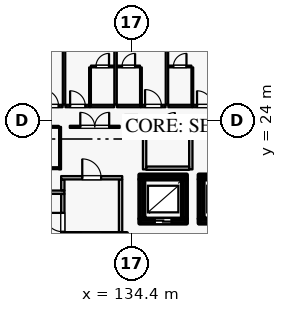
"""IFC4 building model, lengths in metres.
Left out: names, types, materials, properties, quantities, classifications, styles, units other than length and angle.
Written with IfcOpenShell. Run it as: python <this file> out.ifc"""

import sys

from ifc_helpers import new_model, si_unit, direction, frame, frame_2d, origin, origin_2d, place, context, subcontext, project, spatial, rectangle, extrude, element, fill, save


model = new_model("IFC4")
c1 = context("Model", 3, precision=1e-05, world=origin(), true_north=direction((0.0, 1.0)))
c2 = subcontext(c1, "Body", "Model", "MODEL_VIEW")
j1 = project(units=[si_unit("LENGTHUNIT", "METRE"), si_unit("PLANEANGLEUNIT", "RADIAN")], contexts=[c1])
p1 = place(None, origin())
s1 = spatial("IfcSite", under=j1, at=p1, CompositionType="ELEMENT")
p2 = place(p1, origin())
s2 = spatial("IfcBuilding", under=s1, at=p2, CompositionType="ELEMENT")
p3 = place(p2, frame((0.0, 0.0, 43.2)))
s3 = spatial("IfcBuildingStorey", under=s2, at=p3, CompositionType="ELEMENT", Elevation=43.2)
p4 = place(p3, frame((134.4, 24.0, 0.0), z_axis=(0.0, 0.0, 1.0), x_axis=(1.0, 0.0, 0.0)))
e1 = element("IfcColumn", 1, at=p4, inside=s3, PredefinedType="COLUMN", context=c2, shape_type="SweptSolid", body=[
    extrude(rectangle(XDim=0.6, YDim=0.6, at=origin_2d()), origin(), (0.0, 0.0, 1.0), 4.2),
])
p5 = place(p3, frame((134.95, 17.4, 0.0), z_axis=(0.0, 0.0, 1.0), x_axis=(1.0, 0.0, 0.0)))
e2 = element("IfcWall", 2, at=p5, inside=s3, PredefinedType="SHEAR", context=c2, shape_type="SweptSolid", body=[
    extrude(rectangle(XDim=3.1, YDim=0.3, at=frame_2d((1.55, 0.0))), origin(), (0.0, 0.0, 1.0), 3.935),
])
p6 = place(p5, frame((1.0, 0.0, 0.0)))
e3 = element("IfcOpeningElement", 3, at=p6, cuts=e2, PredefinedType="OPENING", context=c2, shape_type="SweptSolid", body=[
    extrude(rectangle(XDim=1.1, YDim=2.2, at=frame_2d((0.55, 1.1))), frame((0.0, 0.16, 0.0), z_axis=(0.0, -1.0, 0.0), x_axis=(1.0, 0.0, 0.0)), (0.0, 0.0, 1.0), 0.32),
])
p7 = place(p3, frame((137.9, 17.555, 0.0), z_axis=(0.0, 0.0, 1.0), x_axis=(0.0, 1.0, 0.0)))
e4 = element("IfcWall", 4, at=p7, inside=s3, PredefinedType="SHEAR", context=c2, shape_type="SweptSolid", body=[
    extrude(rectangle(XDim=2.59, YDim=0.3, at=frame_2d((1.295, 0.0))), origin(), (0.0, 0.0, 1.0), 3.935),
])
p8 = place(p3, frame((138.05, 20.3, 0.0), z_axis=(0.0, 0.0, 1.0), x_axis=(-1.0, 0.0, 0.0)))
e5 = element("IfcWall", 5, at=p8, inside=s3, PredefinedType="SHEAR", context=c2, shape_type="SweptSolid", body=[
    extrude(rectangle(XDim=3.1, YDim=0.3, at=frame_2d((1.55, 0.0))), origin(), (0.0, 0.0, 1.0), 3.935),
])
p9 = place(p3, frame((135.1, 20.145, 0.0), z_axis=(0.0, 0.0, 1.0), x_axis=(0.0, -1.0, 0.0)))
e6 = element("IfcWall", 6, at=p9, inside=s3, PredefinedType="SHEAR", context=c2, shape_type="SweptSolid", body=[
    extrude(rectangle(XDim=2.59, YDim=0.3, at=frame_2d((1.295, 0.0))), origin(), (0.0, 0.0, 1.0), 3.935),
])
p10 = place(p3, frame((138.85, 17.4, 0.0), z_axis=(0.0, 0.0, 1.0), x_axis=(1.0, 0.0, 0.0)))
e7 = element("IfcWall", 7, at=p10, inside=s3, PredefinedType="SHEAR", context=c2, shape_type="SweptSolid", body=[
    extrude(rectangle(XDim=3.1, YDim=0.3, at=frame_2d((1.55, 0.0))), origin(), (0.0, 0.0, 1.0), 3.935),
])
p11 = place(p10, frame((1.0, 0.0, 0.0)))
e8 = element("IfcOpeningElement", 8, at=p11, cuts=e7, PredefinedType="OPENING", context=c2, shape_type="SweptSolid", body=[
    extrude(rectangle(XDim=1.1, YDim=2.2, at=frame_2d((0.55, 1.1))), frame((0.0, 0.16, 0.0), z_axis=(0.0, -1.0, 0.0), x_axis=(1.0, 0.0, 0.0)), (0.0, 0.0, 1.0), 0.32),
])
p12 = place(p3, frame((141.95, 20.3, 0.0), z_axis=(0.0, 0.0, 1.0), x_axis=(-1.0, 0.0, 0.0)))
e9 = element("IfcWall", 9, at=p12, inside=s3, PredefinedType="SHEAR", context=c2, shape_type="SweptSolid", body=[
    extrude(rectangle(XDim=3.1, YDim=0.3, at=frame_2d((1.55, 0.0))), origin(), (0.0, 0.0, 1.0), 3.935),
])
p13 = place(p3, frame((139.0, 20.145, 0.0), z_axis=(0.0, 0.0, 1.0), x_axis=(0.0, -1.0, 0.0)))
e10 = element("IfcWall", 10, at=p13, inside=s3, PredefinedType="SHEAR", context=c2, shape_type="SweptSolid", body=[
    extrude(rectangle(XDim=2.59, YDim=0.3, at=frame_2d((1.295, 0.0))), origin(), (0.0, 0.0, 1.0), 3.935),
])
p14 = place(p3, frame((134.11, 16.45, 0.0), z_axis=(0.0, 0.0, 1.0), x_axis=(-1.0, 0.0, 0.0)))
e11 = element("IfcWall", 11, at=p14, inside=s3, PredefinedType="SHEAR", context=c2, shape_type="SweptSolid", body=[
    extrude(rectangle(XDim=4.06, YDim=0.3, at=frame_2d((2.03, 0.0))), origin(), (0.0, 0.0, 1.0), 3.935),
])
p15 = place(p14, frame((1.685, 0.0, 0.0)))
e12 = element("IfcOpeningElement", 12, at=p15, cuts=e11, PredefinedType="OPENING", context=c2, shape_type="SweptSolid", body=[
    extrude(rectangle(XDim=1.25, YDim=2.25, at=frame_2d((0.625, 1.125))), frame((0.0, 0.16, 0.0), z_axis=(0.0, -1.0, 0.0), x_axis=(1.0, 0.0, 0.0)), (0.0, 0.0, 1.0), 0.32),
])
p16 = place(p3, frame((126.19, 19.3, 0.0), z_axis=(0.0, 0.0, 1.0), x_axis=(1.0, 0.0, 0.0)))
e13 = element("IfcWall", 13, at=p16, inside=s3, PredefinedType="PARTITIONING", context=c2, shape_type="SweptSolid", body=[
    extrude(rectangle(XDim=3.82, YDim=0.22, at=frame_2d((1.91, 0.0))), origin(), (0.0, 0.0, 1.0), 3.935),
])
p17 = place(p16, frame((1.35, 0.0, 0.0)))
e14 = element("IfcOpeningElement", 14, at=p17, cuts=e13, PredefinedType="OPENING", context=c2, shape_type="SweptSolid", body=[
    extrude(rectangle(XDim=1.12, YDim=2.2, at=frame_2d((0.56, 1.1))), frame((0.0, 0.12, 0.0), z_axis=(0.0, -1.0, 0.0), x_axis=(1.0, 0.0, 0.0)), (0.0, 0.0, 1.0), 0.24),
])
p18 = place(p3, frame((129.9, 13.365, 0.0), z_axis=(0.0, 0.0, 1.0), x_axis=(0.0, 1.0, 0.0)))
e15 = element("IfcWall", 15, at=p18, inside=s3, PredefinedType="PARTITIONING", context=c2, shape_type="SweptSolid", body=[
    extrude(rectangle(XDim=5.82, YDim=0.22, at=frame_2d((2.91, 0.0))), origin(), (0.0, 0.0, 1.0), 3.935),
])
p19 = place(p18, frame((3.335, 0.0, 0.0)))
e16 = element("IfcOpeningElement", 16, at=p19, cuts=e15, PredefinedType="OPENING", context=c2, shape_type="SweptSolid", body=[
    extrude(rectangle(XDim=1.24, YDim=2.2, at=frame_2d((0.62, 1.1))), frame((0.0, 0.12, 0.0), z_axis=(0.0, -1.0, 0.0), x_axis=(1.0, 0.0, 0.0)), (0.0, 0.0, 1.0), 0.24),
])
p20 = place(p3, frame((129.9, 19.415, 0.0), z_axis=(0.0, 0.0, 1.0), x_axis=(0.0, 1.0, 0.0)))
e17 = element("IfcWall", 17, at=p20, inside=s3, PredefinedType="PARTITIONING", context=c2, shape_type="SweptSolid", body=[
    extrude(rectangle(XDim=0.72, YDim=0.22, at=frame_2d((0.36, 0.0))), origin(), (0.0, 0.0, 1.0), 3.935),
])
p21 = place(p3, frame((133.7, 16.605, 0.0), z_axis=(0.0, 0.0, 1.0), x_axis=(0.0, 1.0, 0.0)))
e18 = element("IfcWall", 18, at=p21, inside=s3, PredefinedType="PARTITIONING", context=c2, shape_type="SweptSolid", body=[
    extrude(rectangle(XDim=3.53, YDim=0.22, at=frame_2d((1.765, 0.0))), origin(), (0.0, 0.0, 1.0), 3.935),
])
p22 = place(p3, frame((129.79, 20.25, 0.0), z_axis=(0.0, 0.0, 1.0), x_axis=(1.0, 0.0, 0.0)))
e19 = element("IfcWall", 19, at=p22, inside=s3, PredefinedType="PARTITIONING", context=c2, shape_type="SweptSolid", body=[
    extrude(rectangle(XDim=4.02, YDim=0.22, at=frame_2d((2.01, 0.0))), origin(), (0.0, 0.0, 1.0), 3.935),
])
p23 = place(p22, frame((1.39, 0.0, 0.0)))
e20 = element("IfcOpeningElement", 20, at=p23, cuts=e19, PredefinedType="OPENING", context=c2, shape_type="SweptSolid", body=[
    extrude(rectangle(XDim=1.24, YDim=2.2, at=frame_2d((0.62, 1.1))), frame((0.0, 0.12, 0.0), z_axis=(0.0, -1.0, 0.0), x_axis=(1.0, 0.0, 0.0)), (0.0, 0.0, 1.0), 0.24),
])
p24 = place(p3, frame((128.27, 24.97, 0.0), z_axis=(0.0, 0.0, 1.0), x_axis=(1.0, 0.0, 0.0)))
e21 = element("IfcWall", 21, at=p24, inside=s3, PredefinedType="PARTITIONING", context=c2, shape_type="SweptSolid", body=[
    extrude(rectangle(XDim=1.62, YDim=0.16, at=frame_2d((0.81, 0.0))), origin(), (0.0, 0.0, 1.0), 3.935),
])
p25 = place(p24, frame((0.27, 0.0, 0.0)))
e22 = element("IfcOpeningElement", 22, at=p25, cuts=e21, PredefinedType="OPENING", context=c2, shape_type="SweptSolid", body=[
    extrude(rectangle(XDim=1.08, YDim=2.3, at=frame_2d((0.54, 1.15))), frame((0.0, 0.09, 0.0), z_axis=(0.0, -1.0, 0.0), x_axis=(1.0, 0.0, 0.0)), (0.0, 0.0, 1.0), 0.18),
])
p26 = place(p3, frame((130.07, 24.97, 0.0), z_axis=(0.0, 0.0, 1.0), x_axis=(1.0, 0.0, 0.0)))
e23 = element("IfcWall", 23, at=p26, inside=s3, PredefinedType="PARTITIONING", context=c2, shape_type="SweptSolid", body=[
    extrude(rectangle(XDim=1.62, YDim=0.16, at=frame_2d((0.81, 0.0))), origin(), (0.0, 0.0, 1.0), 3.935),
])
p27 = place(p26, frame((0.31, 0.0, 0.0)))
e24 = element("IfcOpeningElement", 24, at=p27, cuts=e23, PredefinedType="OPENING", context=c2, shape_type="SweptSolid", body=[
    extrude(rectangle(XDim=1.0, YDim=2.25, at=frame_2d((0.5, 1.125))), frame((0.0, 0.09, 0.0), z_axis=(0.0, -1.0, 0.0), x_axis=(1.0, 0.0, 0.0)), (0.0, 0.0, 1.0), 0.18),
])
p28 = place(p3, frame((131.7, 24.97, 0.0), z_axis=(0.0, 0.0, 1.0), x_axis=(1.0, 0.0, 0.0)))
e25 = element("IfcWall", 25, at=p28, inside=s3, PredefinedType="PARTITIONING", context=c2, shape_type="SweptSolid", body=[
    extrude(rectangle(XDim=1.58, YDim=0.16, at=frame_2d((0.79, 0.0))), origin(), (0.0, 0.0, 1.0), 3.935),
])
p29 = place(p3, frame((131.69, 25.06, 0.0), z_axis=(0.0, 0.0, 1.0), x_axis=(0.0, 1.0, 0.0)))
e26 = element("IfcWall", 26, at=p29, inside=s3, PredefinedType="PARTITIONING", context=c2, shape_type="SweptSolid", body=[
    extrude(rectangle(XDim=2.45, YDim=0.115, at=frame_2d((1.225, 0.0))), origin(), (0.0, 0.0, 1.0), 3.935),
])
p30 = place(p3, frame((131.75, 27.57, 0.0), z_axis=(0.0, 0.0, 1.0), x_axis=(1.0, 0.0, 0.0)))
e27 = element("IfcWall", 27, at=p30, inside=s3, PredefinedType="PARTITIONING", context=c2, shape_type="SweptSolid", body=[
    extrude(rectangle(XDim=1.52, YDim=0.115, at=frame_2d((0.76, 0.0))), origin(), (0.0, 0.0, 1.0), 3.935),
])
p31 = place(p30, frame((0.33, 0.0, 0.0)))
e28 = element("IfcOpeningElement", 28, at=p31, cuts=e27, PredefinedType="OPENING", context=c2, shape_type="SweptSolid", body=[
    extrude(rectangle(XDim=0.86, YDim=2.12, at=frame_2d((0.43, 1.06))), frame((0.0, 0.067, 0.0), z_axis=(0.0, -1.0, 0.0), x_axis=(1.0, 0.0, 0.0)), (0.0, 0.0, 1.0), 0.135),
])
p32 = place(p3, frame((129.98, 25.06, 0.0), z_axis=(0.0, 0.0, 1.0), x_axis=(0.0, 1.0, 0.0)))
e29 = element("IfcWall", 29, at=p32, inside=s3, PredefinedType="PARTITIONING", context=c2, shape_type="SweptSolid", body=[
    extrude(rectangle(XDim=6.6, YDim=0.16, at=frame_2d((3.3, 0.0))), origin(), (0.0, 0.0, 1.0), 3.935),
])
p33 = place(p3, frame((133.46, 24.97, 0.0), z_axis=(0.0, 0.0, 1.0), x_axis=(1.0, 0.0, 0.0)))
e30 = element("IfcWall", 30, at=p33, inside=s3, PredefinedType="PARTITIONING", context=c2, shape_type="SweptSolid", body=[
    extrude(rectangle(XDim=1.57, YDim=0.16, at=frame_2d((0.785, 0.0))), origin(), (0.0, 0.0, 1.0), 3.935),
])
p34 = place(p3, frame((135.04, 24.97, 0.0), z_axis=(0.0, 0.0, 1.0), x_axis=(1.0, 0.0, 0.0)))
e31 = element("IfcWall", 31, at=p34, inside=s3, PredefinedType="PARTITIONING", context=c2, shape_type="SweptSolid", body=[
    extrude(rectangle(XDim=1.62, YDim=0.16, at=frame_2d((0.81, 0.0))), origin(), (0.0, 0.0, 1.0), 3.935),
])
p35 = place(p34, frame((0.27, 0.0, 0.0)))
e32 = element("IfcOpeningElement", 32, at=p35, cuts=e31, PredefinedType="OPENING", context=c2, shape_type="SweptSolid", body=[
    extrude(rectangle(XDim=1.08, YDim=2.3, at=frame_2d((0.54, 1.15))), frame((0.0, 0.09, 0.0), z_axis=(0.0, -1.0, 0.0), x_axis=(1.0, 0.0, 0.0)), (0.0, 0.0, 1.0), 0.18),
])
p36 = place(p3, frame((135.04, 25.06, 0.0), z_axis=(0.0, 0.0, 1.0), x_axis=(0.0, 1.0, 0.0)))
e33 = element("IfcWall", 33, at=p36, inside=s3, PredefinedType="PARTITIONING", context=c2, shape_type="SweptSolid", body=[
    extrude(rectangle(XDim=2.45, YDim=0.115, at=frame_2d((1.225, 0.0))), origin(), (0.0, 0.0, 1.0), 3.935),
])
p37 = place(p3, frame((133.47, 27.57, 0.0), z_axis=(0.0, 0.0, 1.0), x_axis=(1.0, 0.0, 0.0)))
e34 = element("IfcWall", 34, at=p37, inside=s3, PredefinedType="PARTITIONING", context=c2, shape_type="SweptSolid", body=[
    extrude(rectangle(XDim=1.51, YDim=0.115, at=frame_2d((0.755, 0.0))), origin(), (0.0, 0.0, 1.0), 3.935),
])
p38 = place(p37, frame((0.325, 0.0, 0.0)))
e35 = element("IfcOpeningElement", 35, at=p38, cuts=e34, PredefinedType="OPENING", context=c2, shape_type="SweptSolid", body=[
    extrude(rectangle(XDim=0.86, YDim=2.12, at=frame_2d((0.43, 1.06))), frame((0.0, 0.067, 0.0), z_axis=(0.0, -1.0, 0.0), x_axis=(1.0, 0.0, 0.0)), (0.0, 0.0, 1.0), 0.135),
])
p39 = place(p3, frame((133.37, 25.06, 0.0), z_axis=(0.0, 0.0, 1.0), x_axis=(0.0, 1.0, 0.0)))
e36 = element("IfcWall", 36, at=p39, inside=s3, PredefinedType="PARTITIONING", context=c2, shape_type="SweptSolid", body=[
    extrude(rectangle(XDim=6.6, YDim=0.16, at=frame_2d((3.3, 0.0))), origin(), (0.0, 0.0, 1.0), 3.935),
])
p40 = place(p3, frame((136.84, 24.97, 0.0), z_axis=(0.0, 0.0, 1.0), x_axis=(1.0, 0.0, 0.0)))
e37 = element("IfcWall", 37, at=p40, inside=s3, PredefinedType="PARTITIONING", context=c2, shape_type="SweptSolid", body=[
    extrude(rectangle(XDim=1.57, YDim=0.16, at=frame_2d((0.785, 0.0))), origin(), (0.0, 0.0, 1.0), 3.935),
])
p41 = place(p3, frame((138.42, 24.97, 0.0), z_axis=(0.0, 0.0, 1.0), x_axis=(1.0, 0.0, 0.0)))
e38 = element("IfcWall", 38, at=p41, inside=s3, PredefinedType="PARTITIONING", context=c2, shape_type="SweptSolid", body=[
    extrude(rectangle(XDim=1.62, YDim=0.16, at=frame_2d((0.81, 0.0))), origin(), (0.0, 0.0, 1.0), 3.935),
])
p42 = place(p41, frame((0.31, 0.0, 0.0)))
e39 = element("IfcOpeningElement", 39, at=p42, cuts=e38, PredefinedType="OPENING", context=c2, shape_type="SweptSolid", body=[
    extrude(rectangle(XDim=1.0, YDim=2.25, at=frame_2d((0.5, 1.125))), frame((0.0, 0.09, 0.0), z_axis=(0.0, -1.0, 0.0), x_axis=(1.0, 0.0, 0.0)), (0.0, 0.0, 1.0), 0.18),
])
p43 = place(p3, frame((138.42, 25.06, 0.0), z_axis=(0.0, 0.0, 1.0), x_axis=(0.0, 1.0, 0.0)))
e40 = element("IfcWall", 40, at=p43, inside=s3, PredefinedType="PARTITIONING", context=c2, shape_type="SweptSolid", body=[
    extrude(rectangle(XDim=2.45, YDim=0.115, at=frame_2d((1.225, 0.0))), origin(), (0.0, 0.0, 1.0), 3.935),
])
p44 = place(p3, frame((136.85, 27.57, 0.0), z_axis=(0.0, 0.0, 1.0), x_axis=(1.0, 0.0, 0.0)))
e41 = element("IfcWall", 41, at=p44, inside=s3, PredefinedType="PARTITIONING", context=c2, shape_type="SweptSolid", body=[
    extrude(rectangle(XDim=1.51, YDim=0.115, at=frame_2d((0.755, 0.0))), origin(), (0.0, 0.0, 1.0), 3.935),
])
p45 = place(p44, frame((0.325, 0.0, 0.0)))
e42 = element("IfcOpeningElement", 42, at=p45, cuts=e41, PredefinedType="OPENING", context=c2, shape_type="SweptSolid", body=[
    extrude(rectangle(XDim=0.86, YDim=2.12, at=frame_2d((0.43, 1.06))), frame((0.0, 0.067, 0.0), z_axis=(0.0, -1.0, 0.0), x_axis=(1.0, 0.0, 0.0)), (0.0, 0.0, 1.0), 0.135),
])
p46 = place(p3, frame((136.75, 25.06, 0.0), z_axis=(0.0, 0.0, 1.0), x_axis=(0.0, 1.0, 0.0)))
e43 = element("IfcWall", 43, at=p46, inside=s3, PredefinedType="PARTITIONING", context=c2, shape_type="SweptSolid", body=[
    extrude(rectangle(XDim=6.6, YDim=0.16, at=frame_2d((3.3, 0.0))), origin(), (0.0, 0.0, 1.0), 3.935),
])
p47 = place(p3, frame((138.96, 23.6, 0.0), z_axis=(0.0, 0.0, 1.0), x_axis=(1.0, 0.0, 0.0)))
e44 = element("IfcWall", 44, at=p47, inside=s3, PredefinedType="PARTITIONING", context=c2, shape_type="SweptSolid", body=[
    extrude(rectangle(XDim=3.08, YDim=0.14, at=frame_2d((1.54, 0.0))), origin(), (0.0, 0.0, 1.0), 3.935),
])
p48 = place(p47, frame((0.59, 0.0, 0.0)))
e45 = element("IfcOpeningElement", 45, at=p48, cuts=e44, PredefinedType="OPENING", context=c2, shape_type="SweptSolid", body=[
    extrude(rectangle(XDim=1.9, YDim=2.4, at=frame_2d((0.95, 1.2))), frame((0.0, 0.08, 0.0), z_axis=(0.0, -1.0, 0.0), x_axis=(1.0, 0.0, 0.0)), (0.0, 0.0, 1.0), 0.16),
])
p49 = place(p3, frame((130.36, 23.6, 0.0), z_axis=(0.0, 0.0, 1.0), x_axis=(1.0, 0.0, 0.0)))
e46 = element("IfcWall", 46, at=p49, inside=s3, PredefinedType="PARTITIONING", context=c2, shape_type="SweptSolid", body=[
    extrude(rectangle(XDim=3.28, YDim=0.14, at=frame_2d((1.64, 0.0))), origin(), (0.0, 0.0, 1.0), 3.935),
])
p50 = place(p49, frame((0.69, 0.0, 0.0)))
e47 = element("IfcOpeningElement", 47, at=p50, cuts=e46, PredefinedType="OPENING", context=c2, shape_type="SweptSolid", body=[
    extrude(rectangle(XDim=1.9, YDim=2.4, at=frame_2d((0.95, 1.2))), frame((0.0, 0.08, 0.0), z_axis=(0.0, -1.0, 0.0), x_axis=(1.0, 0.0, 0.0)), (0.0, 0.0, 1.0), 0.16),
])
p51 = place(p3, frame((135.36, 23.6, 0.0), z_axis=(0.0, 0.0, 1.0), x_axis=(1.0, 0.0, 0.0)))
e48 = element("IfcWall", 48, at=p51, inside=s3, PredefinedType="PARTITIONING", context=c2, shape_type="SweptSolid", body=[
    extrude(rectangle(XDim=2.88, YDim=0.22, at=frame_2d((1.44, 0.0))), origin(), (0.0, 0.0, 1.0), 3.935),
])
p52 = place(p51, frame((0.97, 0.0, 0.0)))
e49 = element("IfcOpeningElement", 49, at=p52, cuts=e48, PredefinedType="OPENING", context=c2, shape_type="SweptSolid", body=[
    extrude(rectangle(XDim=0.94, YDim=2.15, at=frame_2d((0.47, 1.075))), frame((0.0, 0.12, 0.0), z_axis=(0.0, -1.0, 0.0), x_axis=(1.0, 0.0, 0.0)), (0.0, 0.0, 1.0), 0.24),
])
p53 = place(p3, frame((126.76, 23.6, 0.0), z_axis=(0.0, 0.0, 1.0), x_axis=(1.0, 0.0, 0.0)))
e50 = element("IfcWall", 50, at=p53, inside=s3, PredefinedType="PARTITIONING", context=c2, shape_type="SweptSolid", body=[
    extrude(rectangle(XDim=2.88, YDim=0.125, at=frame_2d((1.44, 0.0))), origin(), (0.0, 0.0, 1.0), 3.935),
])
p54 = place(p53, frame((0.95, 0.0, 0.0)))
e51 = element("IfcOpeningElement", 51, at=p54, cuts=e50, PredefinedType="OPENING", context=c2, shape_type="SweptSolid", body=[
    extrude(rectangle(XDim=0.98, YDim=2.15, at=frame_2d((0.49, 1.075))), frame((0.0, 0.073, 0.0), z_axis=(0.0, -1.0, 0.0), x_axis=(1.0, 0.0, 0.0)), (0.0, 0.0, 1.0), 0.145),
])
for number, where, z_axis, x_axis in (
    (52, (135.28, 20.8, 0.0), (0.0, 0.0, 1.0), (0.0, 1.0, 0.0)),
    (53, (138.32, 20.8, 0.0), (0.0, 0.0, 1.0), (0.0, 1.0, 0.0)),
):
    element("IfcWall", number, at=place(p3, frame(where, z_axis=z_axis, x_axis=x_axis)), inside=s3, PredefinedType="PARTITIONING", context=c2, shape_type="SweptSolid", body=[
        extrude(rectangle(XDim=2.748, YDim=0.22, at=frame_2d((1.374, 0.0))), origin(), (0.0, 0.0, 1.0), 3.935),
    ])
p55 = place(p3, frame((135.39, 20.88, 0.0), z_axis=(0.0, 0.0, 1.0), x_axis=(1.0, 0.0, 0.0)))
e54 = element("IfcWall", 54, at=p55, inside=s3, PredefinedType="PARTITIONING", context=c2, shape_type="SweptSolid", body=[
    extrude(rectangle(XDim=2.82, YDim=0.22, at=frame_2d((1.41, 0.0))), origin(), (0.0, 0.0, 1.0), 3.935),
])
p56 = place(p3, frame((129.72, 20.8, 0.0), z_axis=(0.0, 0.0, 1.0), x_axis=(0.0, 1.0, 0.0)))
e55 = element("IfcWall", 55, at=p56, inside=s3, PredefinedType="PARTITIONING", context=c2, shape_type="SweptSolid", body=[
    extrude(rectangle(XDim=2.796, YDim=0.125, at=frame_2d((1.398, 0.0))), origin(), (0.0, 0.0, 1.0), 3.935),
])
p57 = place(p3, frame((126.742, 20.88, 0.0), z_axis=(0.0, 0.0, 1.0), x_axis=(1.0, 0.0, 0.0)))
e56 = element("IfcWall", 56, at=p57, inside=s3, PredefinedType="PARTITIONING", context=c2, shape_type="SweptSolid", body=[
    extrude(rectangle(XDim=2.915, YDim=0.125, at=frame_2d((1.458, 0.0))), origin(), (0.0, 0.0, 1.0), 3.935),
])
p58 = place(p6, origin())
e57 = element("IfcDoor", 57, at=p58, inside=s3, OperationType="DOUBLE_DOOR_SLIDING", PredefinedType="DOOR", context=c2, shape_type="SweptSolid", body=[
    extrude(rectangle(XDim=1.1, YDim=2.2, at=frame_2d((0.55, 1.1))), frame((0.0, 0.025, 0.0), z_axis=(0.0, -1.0, 0.0), x_axis=(1.0, 0.0, 0.0)), (0.0, 0.0, 1.0), 0.05),
])
fill(e3, e57)
p59 = place(p19, origin())
e58 = element("IfcDoor", 58, at=p59, inside=s3, OperationType="SINGLE_SWING_RIGHT", PredefinedType="DOOR", context=c2, shape_type="SweptSolid", body=[
    extrude(rectangle(XDim=1.24, YDim=2.2, at=frame_2d((0.62, 1.1))), frame((0.0, 0.025, 0.0), z_axis=(0.0, -1.0, 0.0), x_axis=(1.0, 0.0, 0.0)), (0.0, 0.0, 1.0), 0.05),
])
fill(e16, e58)
p60 = place(p23, origin())
e59 = element("IfcDoor", 59, at=p60, inside=s3, OperationType="SINGLE_SWING_LEFT", PredefinedType="DOOR", context=c2, shape_type="SweptSolid", body=[
    extrude(rectangle(XDim=1.24, YDim=2.2, at=frame_2d((0.62, 1.1))), frame((0.0, 0.025, 0.0), z_axis=(0.0, -1.0, 0.0), x_axis=(1.0, 0.0, 0.0)), (0.0, 0.0, 1.0), 0.05),
])
fill(e20, e59)
p61 = place(p25, origin())
e60 = element("IfcDoor", 60, at=p61, inside=s3, OperationType="SINGLE_SWING_LEFT", PredefinedType="DOOR", context=c2, shape_type="SweptSolid", body=[
    extrude(rectangle(XDim=1.08, YDim=2.3, at=frame_2d((0.54, 1.15))), frame((0.0, 0.025, 0.0), z_axis=(0.0, -1.0, 0.0), x_axis=(1.0, 0.0, 0.0)), (0.0, 0.0, 1.0), 0.05),
])
fill(e22, e60)
p62 = place(p27, origin())
e61 = element("IfcDoor", 61, at=p62, inside=s3, OperationType="SINGLE_SWING_LEFT", PredefinedType="DOOR", context=c2, shape_type="SweptSolid", body=[
    extrude(rectangle(XDim=1.0, YDim=2.25, at=frame_2d((0.5, 1.125))), frame((0.0, 0.025, 0.0), z_axis=(0.0, -1.0, 0.0), x_axis=(1.0, 0.0, 0.0)), (0.0, 0.0, 1.0), 0.05),
])
fill(e24, e61)
p63 = place(p31, origin())
e62 = element("IfcDoor", 62, at=p63, inside=s3, OperationType="SINGLE_SWING_RIGHT", PredefinedType="DOOR", context=c2, shape_type="SweptSolid", body=[
    extrude(rectangle(XDim=0.86, YDim=2.12, at=frame_2d((0.43, 1.06))), frame((0.0, 0.025, 0.0), z_axis=(0.0, -1.0, 0.0), x_axis=(1.0, 0.0, 0.0)), (0.0, 0.0, 1.0), 0.05),
])
fill(e28, e62)
p64 = place(p35, origin())
e63 = element("IfcDoor", 63, at=p64, inside=s3, OperationType="SINGLE_SWING_LEFT", PredefinedType="DOOR", context=c2, shape_type="SweptSolid", body=[
    extrude(rectangle(XDim=1.08, YDim=2.3, at=frame_2d((0.54, 1.15))), frame((0.0, 0.025, 0.0), z_axis=(0.0, -1.0, 0.0), x_axis=(1.0, 0.0, 0.0)), (0.0, 0.0, 1.0), 0.05),
])
fill(e32, e63)
p65 = place(p38, origin())
e64 = element("IfcDoor", 64, at=p65, inside=s3, OperationType="SINGLE_SWING_RIGHT", PredefinedType="DOOR", context=c2, shape_type="SweptSolid", body=[
    extrude(rectangle(XDim=0.86, YDim=2.12, at=frame_2d((0.43, 1.06))), frame((0.0, 0.025, 0.0), z_axis=(0.0, -1.0, 0.0), x_axis=(1.0, 0.0, 0.0)), (0.0, 0.0, 1.0), 0.05),
])
fill(e35, e64)
p66 = place(p42, origin())
e65 = element("IfcDoor", 65, at=p66, inside=s3, OperationType="SINGLE_SWING_LEFT", PredefinedType="DOOR", context=c2, shape_type="SweptSolid", body=[
    extrude(rectangle(XDim=1.0, YDim=2.25, at=frame_2d((0.5, 1.125))), frame((0.0, 0.025, 0.0), z_axis=(0.0, -1.0, 0.0), x_axis=(1.0, 0.0, 0.0)), (0.0, 0.0, 1.0), 0.05),
])
fill(e39, e65)
p67 = place(p45, origin())
e66 = element("IfcDoor", 66, at=p67, inside=s3, OperationType="SINGLE_SWING_RIGHT", PredefinedType="DOOR", context=c2, shape_type="SweptSolid", body=[
    extrude(rectangle(XDim=0.86, YDim=2.12, at=frame_2d((0.43, 1.06))), frame((0.0, 0.025, 0.0), z_axis=(0.0, -1.0, 0.0), x_axis=(1.0, 0.0, 0.0)), (0.0, 0.0, 1.0), 0.05),
])
fill(e42, e66)
p68 = place(p50, origin())
e67 = element("IfcDoor", 67, at=p68, inside=s3, OperationType="DOUBLE_DOOR_SINGLE_SWING", PredefinedType="DOOR", context=c2, shape_type="SweptSolid", body=[
    extrude(rectangle(XDim=1.9, YDim=2.4, at=frame_2d((0.95, 1.2))), frame((0.0, 0.025, 0.0), z_axis=(0.0, -1.0, 0.0), x_axis=(1.0, 0.0, 0.0)), (0.0, 0.0, 1.0), 0.05),
])
fill(e47, e67)
p69 = place(p52, origin())
e68 = element("IfcDoor", 68, at=p69, inside=s3, OperationType="SINGLE_SWING_RIGHT", PredefinedType="DOOR", context=c2, shape_type="SweptSolid", body=[
    extrude(rectangle(XDim=0.94, YDim=2.15, at=frame_2d((0.47, 1.075))), frame((0.0, 0.025, 0.0), z_axis=(0.0, -1.0, 0.0), x_axis=(1.0, 0.0, 0.0)), (0.0, 0.0, 1.0), 0.05),
])
fill(e49, e68)
save(model, sys.argv[1])
